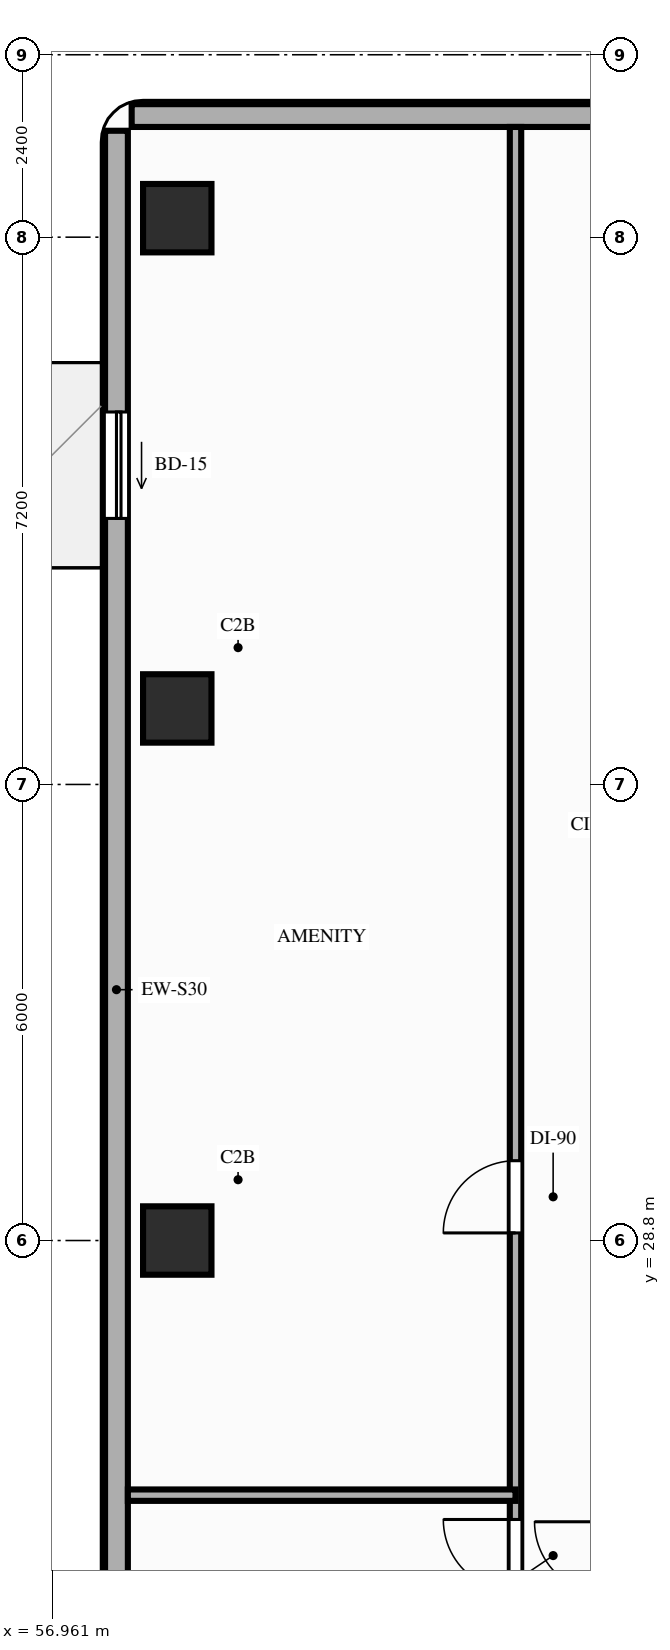
"""IFC4 building model, lengths in metres.
Left out: names, types, materials, properties, quantities, classifications, styles, units other than length and angle.
Written with IfcOpenShell. Run it as: python <this file> out.ifc"""

import sys

from ifc_helpers import new_model, si_unit, direction, frame, frame_2d, origin, origin_2d, place, context, subcontext, project, spatial, rectangle, extrude, element, fill, save


model = new_model("IFC4")
c1 = context("Model", 3, precision=1e-05, world=origin(), true_north=direction((0.0, 1.0)))
c2 = subcontext(c1, "Body", "Model", "MODEL_VIEW")
j1 = project(units=[si_unit("LENGTHUNIT", "METRE"), si_unit("PLANEANGLEUNIT", "RADIAN")], contexts=[c1])
p1 = place(None, origin())
s1 = spatial("IfcSite", under=j1, at=p1, CompositionType="ELEMENT")
p2 = place(p1, origin())
s2 = spatial("IfcBuilding", under=s1, at=p2, CompositionType="ELEMENT")
p3 = place(p2, frame((0.0, 0.0, 83.4)))
s3 = spatial("IfcBuildingStorey", under=s2, at=p3, CompositionType="ELEMENT", Elevation=83.4)
for number, where, z_axis, x_axis in (
    (1, (58.6, 28.8, 0.0), (0.0, 0.0, 1.0), (1.0, 0.0, 0.0)),
    (2, (58.6, 35.8, 0.0), (0.0, 0.0, 1.0), (1.0, 0.0, 0.0)),
    (3, (58.6, 42.25, 0.0), (0.0, 0.0, 1.0), (1.0, 0.0, 0.0)),
):
    element("IfcColumn", number, at=place(p3, frame(where, z_axis=z_axis, x_axis=x_axis)), inside=s3, PredefinedType="COLUMN", context=c2, shape_type="SweptSolid", body=[
        extrude(rectangle(XDim=0.9, YDim=0.9, at=origin_2d()), origin(), (0.0, 0.0, 1.0), 3.2),
    ])
p4 = place(p3, frame((57.8, 43.4, 0.0), z_axis=(0.0, 0.0, 1.0), x_axis=(0.0, -1.0, 0.0)))
e4 = element("IfcWall", 4, at=p4, inside=s3, PredefinedType="STANDARD", context=c2, shape_type="SweptSolid", body=[
    extrude(rectangle(XDim=22.6, YDim=0.3, at=frame_2d((11.3, 0.0))), origin(), (0.0, 0.0, 1.0), 2.57),
])
p5 = place(p4, frame((3.7, 0.0, 0.0)))
e5 = element("IfcOpeningElement", 5, at=p5, cuts=e4, PredefinedType="OPENING", context=c2, shape_type="SweptSolid", body=[
    extrude(rectangle(XDim=1.4, YDim=2.1, at=frame_2d((0.7, 1.05))), frame((0.0, 0.16, 0.0), z_axis=(0.0, -1.0, 0.0), x_axis=(1.0, 0.0, 0.0)), (0.0, 0.0, 1.0), 0.32),
])
p6 = place(p3, frame((72.8, 43.6, 0.0), z_axis=(0.0, 0.0, 1.0), x_axis=(-1.0, 0.0, 0.0)))
e6 = element("IfcWall", 6, at=p6, inside=s3, PredefinedType="STANDARD", context=c2, shape_type="SweptSolid", body=[
    extrude(rectangle(XDim=14.8, YDim=0.3, at=frame_2d((7.4, 0.0))), origin(), (0.0, 0.0, 1.0), 3.02),
])
p7 = place(p3, frame((63.05, 20.75, 0.0), z_axis=(0.0, 0.0, 1.0), x_axis=(0.0, 1.0, 0.0)))
e7 = element("IfcWall", 7, at=p7, inside=s3, PredefinedType="PARTITIONING", context=c2, shape_type="SweptSolid", body=[
    extrude(rectangle(XDim=22.7, YDim=0.15, at=frame_2d((11.35, 0.0))), origin(), (0.0, 0.0, 1.0), 2.6),
])
p8 = place(p7, frame((0.73, 0.0, 0.0)))
e8 = element("IfcOpeningElement", 8, at=p8, cuts=e7, PredefinedType="OPENING", context=c2, shape_type="SweptSolid", body=[
    extrude(rectangle(XDim=0.85, YDim=2.1, at=frame_2d((0.425, 1.05))), frame((0.0, 0.085, 0.0), z_axis=(0.0, -1.0, 0.0), x_axis=(1.0, 0.0, 0.0)), (0.0, 0.0, 1.0), 0.17),
])
p9 = place(p7, frame((3.43, 0.0, 0.0)))
e9 = element("IfcOpeningElement", 9, at=p9, cuts=e7, PredefinedType="OPENING", context=c2, shape_type="SweptSolid", body=[
    extrude(rectangle(XDim=0.95, YDim=2.1, at=frame_2d((0.475, 1.05))), frame((0.0, 0.085, 0.0), z_axis=(0.0, -1.0, 0.0), x_axis=(1.0, 0.0, 0.0)), (0.0, 0.0, 1.0), 0.17),
])
p10 = place(p7, frame((8.15, 0.0, 0.0)))
e10 = element("IfcOpeningElement", 10, at=p10, cuts=e7, PredefinedType="OPENING", context=c2, shape_type="SweptSolid", body=[
    extrude(rectangle(XDim=0.95, YDim=2.15, at=frame_2d((0.475, 1.075))), frame((0.0, 0.085, 0.0), z_axis=(0.0, -1.0, 0.0), x_axis=(1.0, 0.0, 0.0)), (0.0, 0.0, 1.0), 0.17),
])
p11 = place(p3, frame((57.95, 25.45, 0.0), z_axis=(0.0, 0.0, 1.0), x_axis=(1.0, 0.0, 0.0)))
e11 = element("IfcWall", 11, at=p11, inside=s3, PredefinedType="PARTITIONING", context=c2, shape_type="SweptSolid", body=[
    extrude(rectangle(XDim=5.1, YDim=0.15, at=frame_2d((2.55, 0.0))), origin(), (0.0, 0.0, 1.0), 2.6),
])
p12 = place(p5, origin())
e12 = element("IfcDoor", 12, at=p12, inside=s3, OperationType="SLIDING_TO_RIGHT", PredefinedType="DOOR", context=c2, shape_type="SweptSolid", body=[
    extrude(rectangle(XDim=1.4, YDim=2.1, at=frame_2d((0.7, 1.05))), frame((0.0, 0.025, 0.0), z_axis=(0.0, -1.0, 0.0), x_axis=(1.0, 0.0, 0.0)), (0.0, 0.0, 1.0), 0.05),
])
fill(e5, e12)
p13 = place(p9, origin())
e13 = element("IfcDoor", 13, at=p13, inside=s3, OperationType="SINGLE_SWING_RIGHT", PredefinedType="DOOR", context=c2, shape_type="SweptSolid", body=[
    extrude(rectangle(XDim=0.95, YDim=2.1, at=frame_2d((0.475, 1.05))), frame((0.0, 0.025, 0.0), z_axis=(0.0, -1.0, 0.0), x_axis=(1.0, 0.0, 0.0)), (0.0, 0.0, 1.0), 0.05),
])
fill(e9, e13)
p14 = place(p10, origin())
e14 = element("IfcDoor", 14, at=p14, inside=s3, OperationType="SINGLE_SWING_LEFT", PredefinedType="DOOR", context=c2, shape_type="SweptSolid", body=[
    extrude(rectangle(XDim=0.95, YDim=2.15, at=frame_2d((0.475, 1.075))), frame((0.0, 0.025, 0.0), z_axis=(0.0, -1.0, 0.0), x_axis=(1.0, 0.0, 0.0)), (0.0, 0.0, 1.0), 0.05),
])
fill(e10, e14)
save(model, sys.argv[1])
